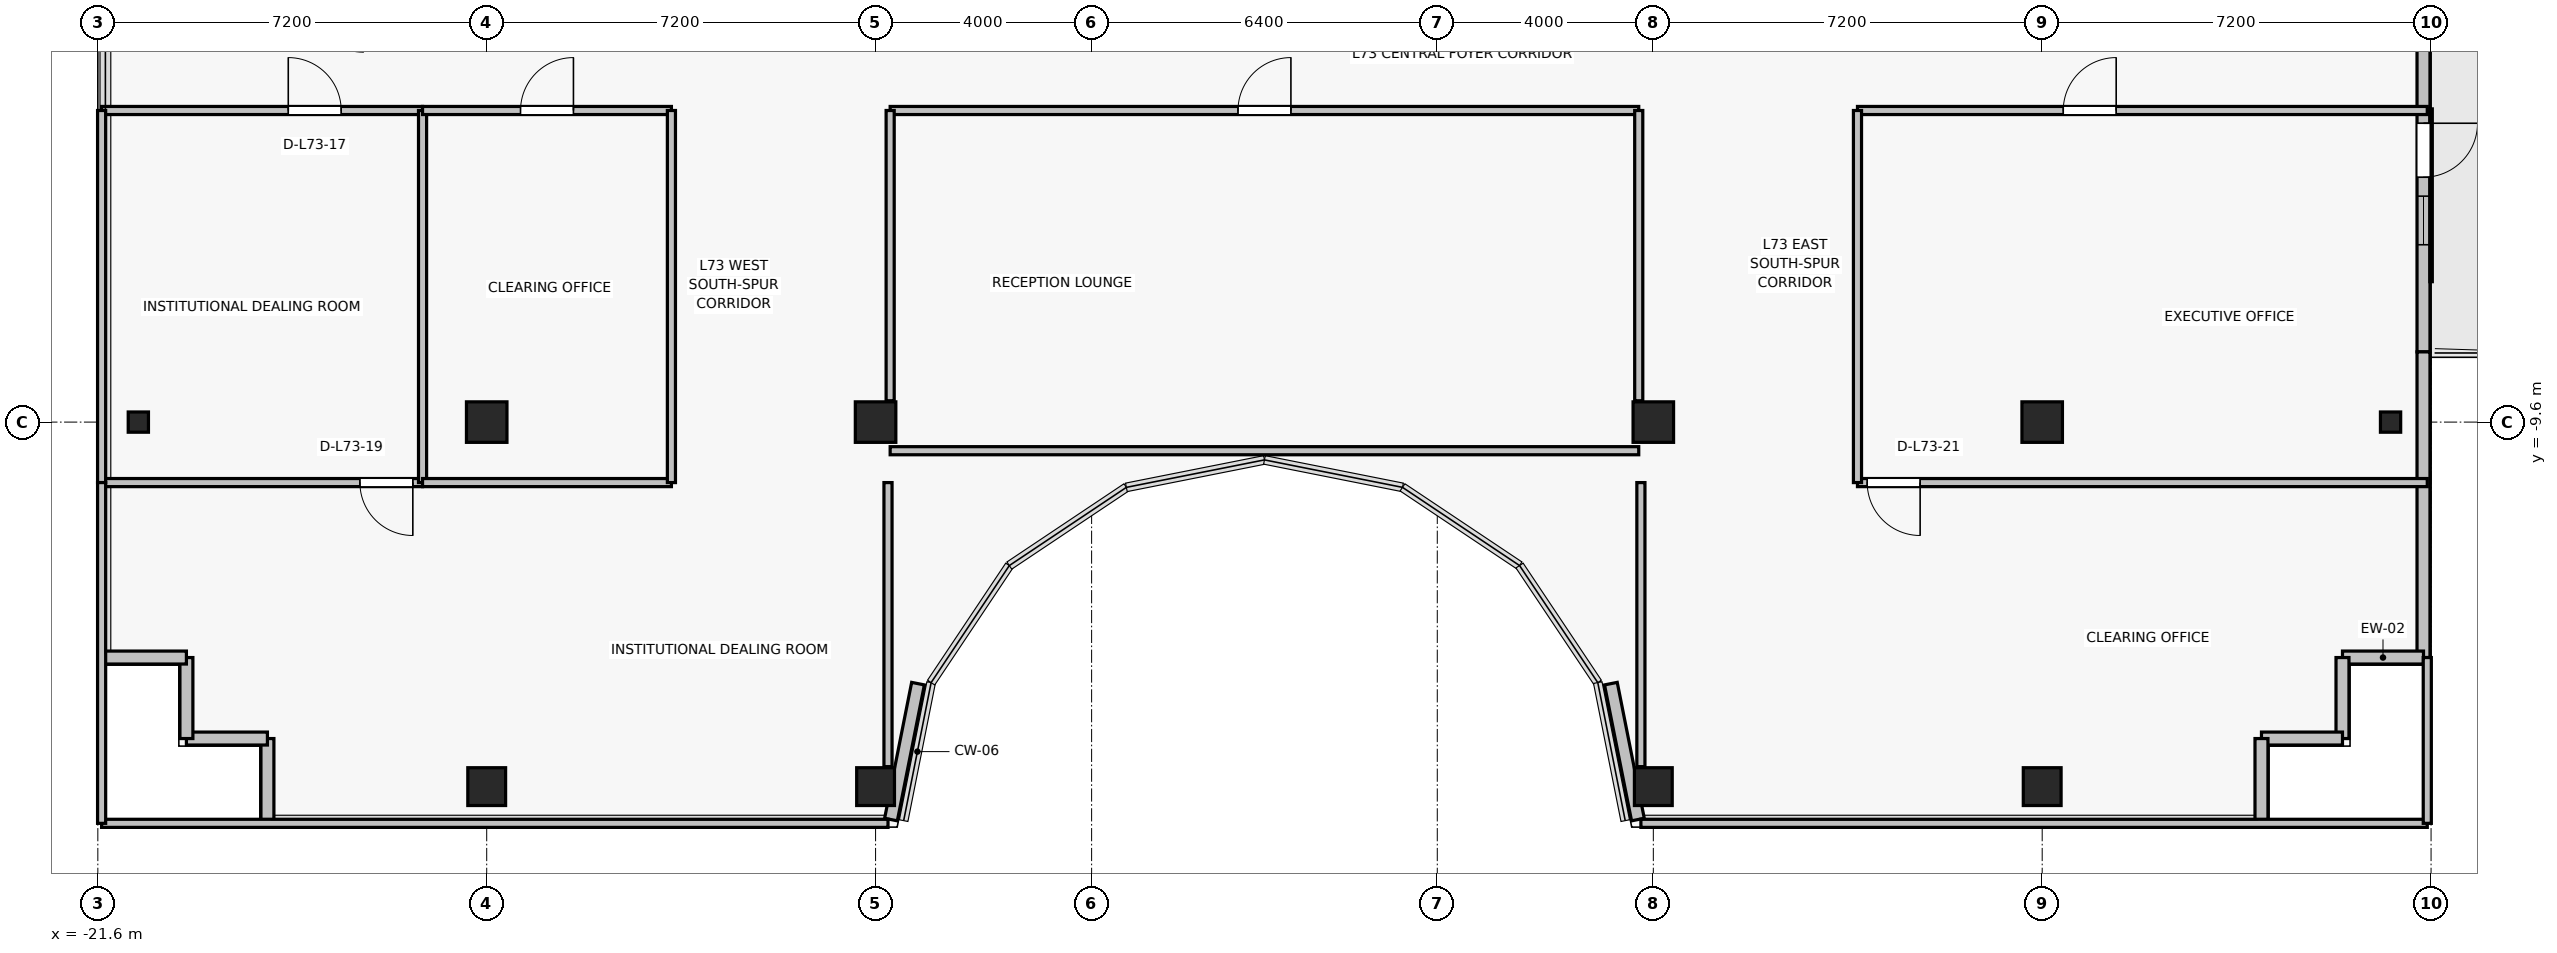
"""IFC4 building model, lengths in metres.
Left out: names, types, materials, properties, quantities, classifications, styles, units other than length and angle.
Written with IfcOpenShell. Run it as: python <this file> out.ifc"""

import sys

from ifc_helpers import new_model, si_unit, direction, frame, frame_2d, origin, origin_2d, place, context, subcontext, project, spatial, rectangle, i_section, extrude, source, transform, mapped, element, fill, save


model = new_model("IFC4")
c1 = context("Model", 3, precision=1e-05, world=origin(), true_north=direction((0.0, 1.0)))
c2 = subcontext(c1, "Body", "Model", "MODEL_VIEW")
j1 = project(units=[si_unit("LENGTHUNIT", "METRE"), si_unit("PLANEANGLEUNIT", "RADIAN")], contexts=[c1])
p1 = place(None, origin())
s1 = spatial("IfcSite", under=j1, at=p1, CompositionType="ELEMENT")
p2 = place(p1, origin())
s2 = spatial("IfcBuilding", under=s1, at=p2, CompositionType="ELEMENT")
p3 = place(p2, frame((0.0, 0.0, 258.4)))
s3 = spatial("IfcBuildingStorey", under=s2, at=p3, CompositionType="ELEMENT", Elevation=258.4)
for number, where, z_axis, x_axis in (
    (1, (-14.4, -9.6, 0.0), (0.0, 0.0, 1.0), (1.0, 0.0, 0.0)),
    (2, (-7.2, -9.6, 0.0), (0.0, 0.0, 1.0), (1.0, 0.0, 0.0)),
    (3, (7.2, -9.6, 0.0), (0.0, 0.0, 1.0), (1.0, 0.0, 0.0)),
    (4, (14.4, -9.6, 0.0), (0.0, 0.0, 1.0), (1.0, 0.0, 0.0)),
):
    element("IfcColumn", number, at=place(p3, frame(where, z_axis=z_axis, x_axis=x_axis)), inside=s3, PredefinedType="COLUMN", context=c2, shape_type="SweptSolid", body=[
        extrude(rectangle(XDim=0.75, YDim=0.75, at=origin_2d()), origin(), (0.0, 0.0, 1.0), 3.3),
    ])
for number, where, z_axis, x_axis in (
    (5, (-14.4, -16.35, 0.0), (0.0, 0.0, 1.0), (1.0, 0.0, 0.0)),
    (6, (-7.2, -16.35, 0.0), (0.0, 0.0, 1.0), (1.0, 0.0, 0.0)),
    (7, (7.2, -16.35, 0.0), (0.0, 0.0, 1.0), (1.0, 0.0, 0.0)),
    (8, (14.4, -16.35, 0.0), (0.0, 0.0, 1.0), (1.0, 0.0, 0.0)),
):
    element("IfcColumn", number, at=place(p3, frame(where, z_axis=z_axis, x_axis=x_axis)), inside=s3, PredefinedType="COLUMN", context=c2, shape_type="SweptSolid", body=[
        extrude(rectangle(XDim=0.7, YDim=0.7, at=origin_2d()), origin(), (0.0, 0.0, 1.0), 3.3),
    ])
for number, where, z_axis, x_axis in (
    (9, (-20.85, -9.6, 0.0), (0.0, 0.0, 1.0), (1.0, 0.0, 0.0)),
    (10, (20.85, -9.6, 0.0), (0.0, 0.0, 1.0), (1.0, 0.0, 0.0)),
):
    element("IfcColumn", number, at=place(p3, frame(where, z_axis=z_axis, x_axis=x_axis)), inside=s3, PredefinedType="COLUMN", context=c2, shape_type="SweptSolid", body=[
        extrude(i_section(OverallWidth=0.375, OverallDepth=0.375, WebThickness=0.017, FlangeThickness=0.027, FilletRadius=0.015, at=origin_2d()), origin(), (0.0, 0.0, 1.0), 3.3),
    ])
p4 = place(p3, frame((21.46, -2.5, 0.0), z_axis=(0.0, 0.0, 1.0), x_axis=(0.0, -1.0, 0.0)))
e11 = element("IfcWall", 11, at=p4, inside=s3, PredefinedType="SOLIDWALL", context=c2, shape_type="SweptSolid", body=[
    extrude(rectangle(XDim=5.8, YDim=0.24, at=frame_2d((2.9, 0.0))), origin(), (0.0, 0.0, 1.0), 3.075),
])
p5 = place(p4, frame((1.566, 0.0, 0.0)))
e12 = element("IfcOpeningElement", 12, at=p5, cuts=e11, PredefinedType="OPENING", context=c2, shape_type="SweptSolid", body=[
    extrude(rectangle(XDim=1.0, YDim=2.2, at=frame_2d((0.5, 1.1))), frame((0.0, 0.13, 0.0), z_axis=(0.0, -1.0, 0.0), x_axis=(1.0, 0.0, 0.0)), (0.0, 0.0, 1.0), 0.26),
])
p6 = place(p4, frame((2.916, 0.0, 0.85)))
e13 = element("IfcOpeningElement", 13, at=p6, cuts=e11, PredefinedType="OPENING", context=c2, shape_type="SweptSolid", body=[
    extrude(rectangle(XDim=0.9, YDim=1.35, at=frame_2d((0.45, 0.675))), frame((0.0, 0.13, 0.0), z_axis=(0.0, -1.0, 0.0), x_axis=(1.0, 0.0, 0.0)), (0.0, 0.0, 1.0), 0.26),
])
p7 = place(p3, frame((21.46, -13.96, 0.0), z_axis=(0.0, 0.0, 1.0), x_axis=(0.0, 1.0, 0.0)))
e14 = element("IfcWall", 14, at=p7, inside=s3, PredefinedType="SOLIDWALL", context=c2, shape_type="SweptSolid", body=[
    extrude(rectangle(XDim=5.66, YDim=0.24, at=frame_2d((2.83, 0.0))), origin(), (0.0, 0.0, 1.0), 3.075),
])
for number, where, z_axis, x_axis in (
    (15, (19.96, -13.96, 0.0), (0.0, 0.0, 1.0), (1.0, 0.0, 0.0)),
    (16, (19.96, -15.46, 0.0), (0.0, 0.0, 1.0), (0.0, 1.0, 0.0)),
    (17, (18.46, -15.46, 0.0), (0.0, 0.0, 1.0), (1.0, 0.0, 0.0)),
    (18, (18.46, -16.96, 0.0), (0.0, 0.0, 1.0), (0.0, 1.0, 0.0)),
):
    element("IfcWall", number, at=place(p3, frame(where, z_axis=z_axis, x_axis=x_axis)), inside=s3, PredefinedType="SOLIDWALL", context=c2, shape_type="SweptSolid", body=[
        extrude(rectangle(XDim=1.5, YDim=0.24, at=frame_2d((0.75, 0.0))), origin(), (0.0, 0.0, 1.0), 3.075),
    ])
for number, where, z_axis, x_axis in (
    (19, (6.414, -14.443, 0.0), (0.0, 0.0, 1.0), (0.195, -0.981, 0.0)),
    (20, (-6.915, -16.96, 0.0), (0.0, 0.0, 1.0), (0.195, 0.981, 0.0)),
):
    element("IfcWall", number, at=place(p3, frame(where, z_axis=z_axis, x_axis=x_axis)), inside=s3, PredefinedType="SOLIDWALL", context=c2, shape_type="SweptSolid", body=[
        extrude(rectangle(XDim=2.566, YDim=0.24, at=frame_2d((1.283, 0.0))), origin(), (0.0, 0.0, 1.0), 3.075),
    ])
for number, where, z_axis, x_axis in (
    (21, (-18.46, -15.46, 0.0), (0.0, 0.0, 1.0), (0.0, -1.0, 0.0)),
    (22, (-19.96, -15.46, 0.0), (0.0, 0.0, 1.0), (1.0, 0.0, 0.0)),
    (23, (-19.96, -13.96, 0.0), (0.0, 0.0, 1.0), (0.0, -1.0, 0.0)),
    (24, (-21.46, -13.96, 0.0), (0.0, 0.0, 1.0), (1.0, 0.0, 0.0)),
):
    element("IfcWall", number, at=place(p3, frame(where, z_axis=z_axis, x_axis=x_axis)), inside=s3, PredefinedType="SOLIDWALL", context=c2, shape_type="SweptSolid", body=[
        extrude(rectangle(XDim=1.5, YDim=0.24, at=frame_2d((0.75, 0.0))), origin(), (0.0, 0.0, 1.0), 3.075),
    ])
p8 = place(p3, frame((-15.588, -10.72, 0.0), z_axis=(0.0, 0.0, 1.0), x_axis=(-1.0, 0.0, 0.0)))
e25 = element("IfcWall", 25, at=p8, inside=s3, PredefinedType="PARTITIONING", context=c2, shape_type="SweptSolid", body=[
    extrude(rectangle(XDim=5.942, YDim=0.15, at=frame_2d((2.971, 0.0))), origin(), (0.0, 0.0, 1.0), 3.075),
])
p9 = place(p8, frame((0.18, 0.0, 0.0)))
e26 = element("IfcOpeningElement", 26, at=p9, cuts=e25, PredefinedType="OPENING", context=c2, shape_type="SweptSolid", body=[
    extrude(rectangle(XDim=0.98, YDim=2.15, at=frame_2d((0.49, 1.075))), frame((0.0, 0.085, 0.0), z_axis=(0.0, -1.0, 0.0), x_axis=(1.0, 0.0, 0.0)), (0.0, 0.0, 1.0), 0.17),
])
p10 = place(p3, frame((-21.53, -3.83, 0.0), z_axis=(0.0, 0.0, 1.0), x_axis=(1.0, 0.0, 0.0)))
e27 = element("IfcWall", 27, at=p10, inside=s3, PredefinedType="PARTITIONING", context=c2, shape_type="SweptSolid", body=[
    extrude(rectangle(XDim=5.942, YDim=0.15, at=frame_2d((2.971, 0.0))), origin(), (0.0, 0.0, 1.0), 2.765),
])
p11 = place(p10, frame((3.456, 0.0, 0.0)))
e28 = element("IfcOpeningElement", 28, at=p11, cuts=e27, PredefinedType="OPENING", context=c2, shape_type="SweptSolid", body=[
    extrude(rectangle(XDim=0.98, YDim=2.15, at=frame_2d((0.49, 1.075))), frame((0.0, 0.085, 0.0), z_axis=(0.0, -1.0, 0.0), x_axis=(1.0, 0.0, 0.0)), (0.0, 0.0, 1.0), 0.17),
])
p12 = place(p3, frame((-21.53, -10.72, 0.0), z_axis=(0.0, 0.0, 1.0), x_axis=(0.0, 1.0, 0.0)))
e29 = element("IfcWall", 29, at=p12, inside=s3, PredefinedType="PARTITIONING", context=c2, shape_type="SweptSolid", body=[
    extrude(rectangle(XDim=6.89, YDim=0.15, at=frame_2d((3.445, 0.0))), origin(), (0.0, 0.0, 1.0), 2.665),
])
p13 = place(p3, frame((-15.588, -3.83, 0.0), z_axis=(0.0, 0.0, 1.0), x_axis=(0.0, -1.0, 0.0)))
e30 = element("IfcWall", 30, at=p13, inside=s3, PredefinedType="PARTITIONING", context=c2, shape_type="SweptSolid", body=[
    extrude(rectangle(XDim=6.89, YDim=0.15, at=frame_2d((3.445, 0.0))), origin(), (0.0, 0.0, 1.0), 2.615),
])
p14 = place(p3, frame((-10.98, -10.72, 0.0), z_axis=(0.0, 0.0, 1.0), x_axis=(-1.0, 0.0, 0.0)))
e31 = element("IfcWall", 31, at=p14, inside=s3, PredefinedType="PARTITIONING", context=c2, shape_type="SweptSolid", body=[
    extrude(rectangle(XDim=4.608, YDim=0.15, at=frame_2d((2.304, 0.0))), origin(), (0.0, 0.0, 1.0), 2.615),
])
p15 = place(p3, frame((-15.588, -3.83, 0.0), z_axis=(0.0, 0.0, 1.0), x_axis=(1.0, 0.0, 0.0)))
e32 = element("IfcWall", 32, at=p15, inside=s3, PredefinedType="PARTITIONING", context=c2, shape_type="SweptSolid", body=[
    extrude(rectangle(XDim=4.608, YDim=0.15, at=frame_2d((2.304, 0.0))), origin(), (0.0, 0.0, 1.0), 2.615),
])
p16 = place(p15, frame((1.814, 0.0, 0.0)))
e33 = element("IfcOpeningElement", 33, at=p16, cuts=e32, PredefinedType="OPENING", context=c2, shape_type="SweptSolid", body=[
    extrude(rectangle(XDim=0.98, YDim=2.15, at=frame_2d((0.49, 1.075))), frame((0.0, 0.085, 0.0), z_axis=(0.0, -1.0, 0.0), x_axis=(1.0, 0.0, 0.0)), (0.0, 0.0, 1.0), 0.17),
])
p17 = place(p3, frame((-10.98, -3.83, 0.0), z_axis=(0.0, 0.0, 1.0), x_axis=(0.0, -1.0, 0.0)))
e34 = element("IfcWall", 34, at=p17, inside=s3, PredefinedType="PARTITIONING", context=c2, shape_type="SweptSolid", body=[
    extrude(rectangle(XDim=6.89, YDim=0.15, at=frame_2d((3.445, 0.0))), origin(), (0.0, 0.0, 1.0), 2.615),
])
p18 = place(p3, frame((-6.97, -17.03, 0.0), z_axis=(0.0, 0.0, 1.0), x_axis=(-1.0, 0.0, 0.0)))
e35 = element("IfcWall", 35, at=p18, inside=s3, PredefinedType="PARTITIONING", context=c2, shape_type="SweptSolid", body=[
    extrude(rectangle(XDim=14.56, YDim=0.15, at=frame_2d((7.28, 0.0))), origin(), (0.0, 0.0, 1.0), 3.075),
])
p19 = place(p3, frame((-21.53, -17.03, 0.0), z_axis=(0.0, 0.0, 1.0), x_axis=(0.0, 1.0, 0.0)))
e36 = element("IfcWall", 36, at=p19, inside=s3, PredefinedType="PARTITIONING", context=c2, shape_type="SweptSolid", body=[
    extrude(rectangle(XDim=6.31, YDim=0.15, at=frame_2d((3.155, 0.0))), origin(), (0.0, 0.0, 1.0), 3.075),
])
p20 = place(p3, frame((-6.97, -10.72, 0.0), z_axis=(0.0, 0.0, 1.0), x_axis=(0.0, -1.0, 0.0)))
e37 = element("IfcWall", 37, at=p20, inside=s3, PredefinedType="PARTITIONING", context=c2, shape_type="SweptSolid", body=[
    extrude(rectangle(XDim=5.26, YDim=0.15, at=frame_2d((2.63, 0.0))), origin(), (0.0, 0.0, 1.0), 2.615),
])
p21 = place(p3, frame((21.53, -10.72, 0.0), z_axis=(0.0, 0.0, 1.0), x_axis=(-1.0, 0.0, 0.0)))
e38 = element("IfcWall", 38, at=p21, inside=s3, PredefinedType="PARTITIONING", context=c2, shape_type="SweptSolid", body=[
    extrude(rectangle(XDim=10.55, YDim=0.15, at=frame_2d((5.275, 0.0))), origin(), (0.0, 0.0, 1.0), 2.615),
])
p22 = place(p21, frame((9.39, 0.0, 0.0)))
e39 = element("IfcOpeningElement", 39, at=p22, cuts=e38, PredefinedType="OPENING", context=c2, shape_type="SweptSolid", body=[
    extrude(rectangle(XDim=0.98, YDim=2.15, at=frame_2d((0.49, 1.075))), frame((0.0, 0.085, 0.0), z_axis=(0.0, -1.0, 0.0), x_axis=(1.0, 0.0, 0.0)), (0.0, 0.0, 1.0), 0.17),
])
p23 = place(p3, frame((10.98, -3.83, 0.0), z_axis=(0.0, 0.0, 1.0), x_axis=(1.0, 0.0, 0.0)))
e40 = element("IfcWall", 40, at=p23, inside=s3, PredefinedType="PARTITIONING", context=c2, shape_type="SweptSolid", body=[
    extrude(rectangle(XDim=10.55, YDim=0.15, at=frame_2d((5.275, 0.0))), origin(), (0.0, 0.0, 1.0), 2.615),
])
p24 = place(p23, frame((3.81, 0.0, 0.0)))
e41 = element("IfcOpeningElement", 41, at=p24, cuts=e40, PredefinedType="OPENING", context=c2, shape_type="SweptSolid", body=[
    extrude(rectangle(XDim=0.98, YDim=2.15, at=frame_2d((0.49, 1.075))), frame((0.0, 0.085, 0.0), z_axis=(0.0, -1.0, 0.0), x_axis=(1.0, 0.0, 0.0)), (0.0, 0.0, 1.0), 0.17),
])
p25 = place(p3, frame((10.98, -10.72, 0.0), z_axis=(0.0, 0.0, 1.0), x_axis=(0.0, 1.0, 0.0)))
e42 = element("IfcWall", 42, at=p25, inside=s3, PredefinedType="PARTITIONING", context=c2, shape_type="SweptSolid", body=[
    extrude(rectangle(XDim=6.89, YDim=0.15, at=frame_2d((3.445, 0.0))), origin(), (0.0, 0.0, 1.0), 2.615),
])
p26 = place(p3, frame((21.53, -17.03, 0.0), z_axis=(0.0, 0.0, 1.0), x_axis=(-1.0, 0.0, 0.0)))
e43 = element("IfcWall", 43, at=p26, inside=s3, PredefinedType="PARTITIONING", context=c2, shape_type="SweptSolid", body=[
    extrude(rectangle(XDim=14.56, YDim=0.15, at=frame_2d((7.28, 0.0))), origin(), (0.0, 0.0, 1.0), 3.075),
])
p27 = place(p3, frame((6.97, -15.98, 0.0), z_axis=(0.0, 0.0, 1.0), x_axis=(0.0, 1.0, 0.0)))
e44 = element("IfcWall", 44, at=p27, inside=s3, PredefinedType="PARTITIONING", context=c2, shape_type="SweptSolid", body=[
    extrude(rectangle(XDim=5.26, YDim=0.15, at=frame_2d((2.63, 0.0))), origin(), (0.0, 0.0, 1.0), 2.615),
])
p28 = place(p3, frame((21.53, -13.96, 0.0), z_axis=(0.0, 0.0, 1.0), x_axis=(0.0, -1.0, 0.0)))
e45 = element("IfcWall", 45, at=p28, inside=s3, PredefinedType="PARTITIONING", context=c2, shape_type="SweptSolid", body=[
    extrude(rectangle(XDim=3.07, YDim=0.15, at=frame_2d((1.535, 0.0))), origin(), (0.0, 0.0, 1.0), 3.075),
])
p29 = place(p3, frame((6.93, -10.13, 0.0), z_axis=(0.0, 0.0, 1.0), x_axis=(-1.0, 0.0, 0.0)))
e46 = element("IfcWall", 46, at=p29, inside=s3, PredefinedType="PARTITIONING", context=c2, shape_type="SweptSolid", body=[
    extrude(rectangle(XDim=13.86, YDim=0.15, at=frame_2d((6.93, 0.0))), origin(), (0.0, 0.0, 1.0), 2.615),
])
p30 = place(p3, frame((-6.93, -3.83, 0.0), z_axis=(0.0, 0.0, 1.0), x_axis=(1.0, 0.0, 0.0)))
e47 = element("IfcWall", 47, at=p30, inside=s3, PredefinedType="PARTITIONING", context=c2, shape_type="SweptSolid", body=[
    extrude(rectangle(XDim=13.86, YDim=0.15, at=frame_2d((6.93, 0.0))), origin(), (0.0, 0.0, 1.0), 2.615),
])
p31 = place(p30, frame((6.44, 0.0, 0.0)))
e48 = element("IfcOpeningElement", 48, at=p31, cuts=e47, PredefinedType="OPENING", context=c2, shape_type="SweptSolid", body=[
    extrude(rectangle(XDim=0.98, YDim=2.15, at=frame_2d((0.49, 1.075))), frame((0.0, 0.085, 0.0), z_axis=(0.0, -1.0, 0.0), x_axis=(1.0, 0.0, 0.0)), (0.0, 0.0, 1.0), 0.17),
])
for number, where, z_axis, x_axis in (
    (49, (-6.93, -9.205, 0.0), (0.0, 0.0, 1.0), (0.0, 1.0, 0.0)),
    (50, (6.93, -3.83, 0.0), (0.0, 0.0, 1.0), (0.0, -1.0, 0.0)),
):
    element("IfcWall", number, at=place(p3, frame(where, z_axis=z_axis, x_axis=x_axis)), inside=s3, PredefinedType="PARTITIONING", context=c2, shape_type="SweptSolid", body=[
        extrude(rectangle(XDim=5.375, YDim=0.15, at=frame_2d((2.688, 0.0))), origin(), (0.0, 0.0, 1.0), 2.615),
    ])
m1 = source(origin(), c2, "Body", "SweptSolid", [
    extrude(rectangle(XDim=1.0, YDim=2.2, at=frame_2d((0.5, 1.1))), frame((0.0, 0.025, 0.0), z_axis=(0.0, -1.0, 0.0), x_axis=(1.0, 0.0, 0.0)), (0.0, 0.0, 1.0), 0.05),
])
p32 = place(p5, origin())
e51 = element("IfcDoor", 51, at=p32, inside=s3, OperationType="SINGLE_SWING_LEFT", PredefinedType="DOOR", context=c2, shape_type="MappedRepresentation", body=[
    mapped(m1, transform((0.0, 0.0, 0.0), x_axis=(1.0, 0.0, 0.0), y_axis=(0.0, 1.0, 0.0), z_axis=(0.0, 0.0, 1.0), scale=1.0)),
])
fill(e12, e51)
m2 = source(origin(), c2, "Body", "SweptSolid", [
    extrude(rectangle(XDim=0.9, YDim=1.35, at=frame_2d((0.45, 0.675))), frame((0.0, 0.03, 0.0), z_axis=(0.0, -1.0, 0.0), x_axis=(1.0, 0.0, 0.0)), (0.0, 0.0, 1.0), 0.06),
])
p33 = place(p6, origin())
e52 = element("IfcWindow", 52, at=p33, inside=s3, PartitioningType="SINGLE_PANEL", PredefinedType="WINDOW", context=c2, shape_type="MappedRepresentation", body=[
    mapped(m2, transform((0.0, 0.0, 0.0), x_axis=(1.0, 0.0, 0.0), y_axis=(0.0, 1.0, 0.0), z_axis=(0.0, 0.0, 1.0), scale=1.0)),
])
fill(e13, e52)
m3 = source(origin(), c2, "Body", "SweptSolid", [
    extrude(rectangle(XDim=0.98, YDim=2.15, at=frame_2d((0.49, 1.075))), frame((0.0, 0.025, 0.0), z_axis=(0.0, -1.0, 0.0), x_axis=(1.0, 0.0, 0.0)), (0.0, 0.0, 1.0), 0.05),
])
p34 = place(p11, origin())
e53 = element("IfcDoor", 53, at=p34, inside=s3, OperationType="SINGLE_SWING_LEFT", PredefinedType="DOOR", context=c2, shape_type="MappedRepresentation", body=[
    mapped(m3, transform((0.0, 0.0, 0.0), x_axis=(1.0, 0.0, 0.0), y_axis=(0.0, 1.0, 0.0), z_axis=(0.0, 0.0, 1.0), scale=1.0)),
])
fill(e28, e53)
p35 = place(p16, origin())
e54 = element("IfcDoor", 54, at=p35, inside=s3, OperationType="SINGLE_SWING_RIGHT", PredefinedType="DOOR", context=c2, shape_type="MappedRepresentation", body=[
    mapped(m3, transform((0.0, 0.0, 0.0), x_axis=(1.0, 0.0, 0.0), y_axis=(0.0, 1.0, 0.0), z_axis=(0.0, 0.0, 1.0), scale=1.0)),
])
fill(e33, e54)
p36 = place(p9, origin())
e55 = element("IfcDoor", 55, at=p36, inside=s3, OperationType="SINGLE_SWING_LEFT", PredefinedType="DOOR", context=c2, shape_type="MappedRepresentation", body=[
    mapped(m3, transform((0.0, 0.0, 0.0), x_axis=(1.0, 0.0, 0.0), y_axis=(0.0, 1.0, 0.0), z_axis=(0.0, 0.0, 1.0), scale=1.0)),
])
fill(e26, e55)
p37 = place(p24, origin())
e56 = element("IfcDoor", 56, at=p37, inside=s3, OperationType="SINGLE_SWING_RIGHT", PredefinedType="DOOR", context=c2, shape_type="MappedRepresentation", body=[
    mapped(m3, transform((0.0, 0.0, 0.0), x_axis=(1.0, 0.0, 0.0), y_axis=(0.0, 1.0, 0.0), z_axis=(0.0, 0.0, 1.0), scale=1.0)),
])
fill(e41, e56)
p38 = place(p22, origin())
e57 = element("IfcDoor", 57, at=p38, inside=s3, OperationType="SINGLE_SWING_LEFT", PredefinedType="DOOR", context=c2, shape_type="MappedRepresentation", body=[
    mapped(m3, transform((0.0, 0.0, 0.0), x_axis=(1.0, 0.0, 0.0), y_axis=(0.0, 1.0, 0.0), z_axis=(0.0, 0.0, 1.0), scale=1.0)),
])
fill(e39, e57)
p39 = place(p31, origin())
e58 = element("IfcDoor", 58, at=p39, inside=s3, OperationType="SINGLE_SWING_RIGHT", PredefinedType="DOOR", context=c2, shape_type="MappedRepresentation", body=[
    mapped(m3, transform((0.0, 0.0, 0.0), x_axis=(1.0, 0.0, 0.0), y_axis=(0.0, 1.0, 0.0), z_axis=(0.0, 0.0, 1.0), scale=1.0)),
])
fill(e48, e58)
save(model, sys.argv[1])
